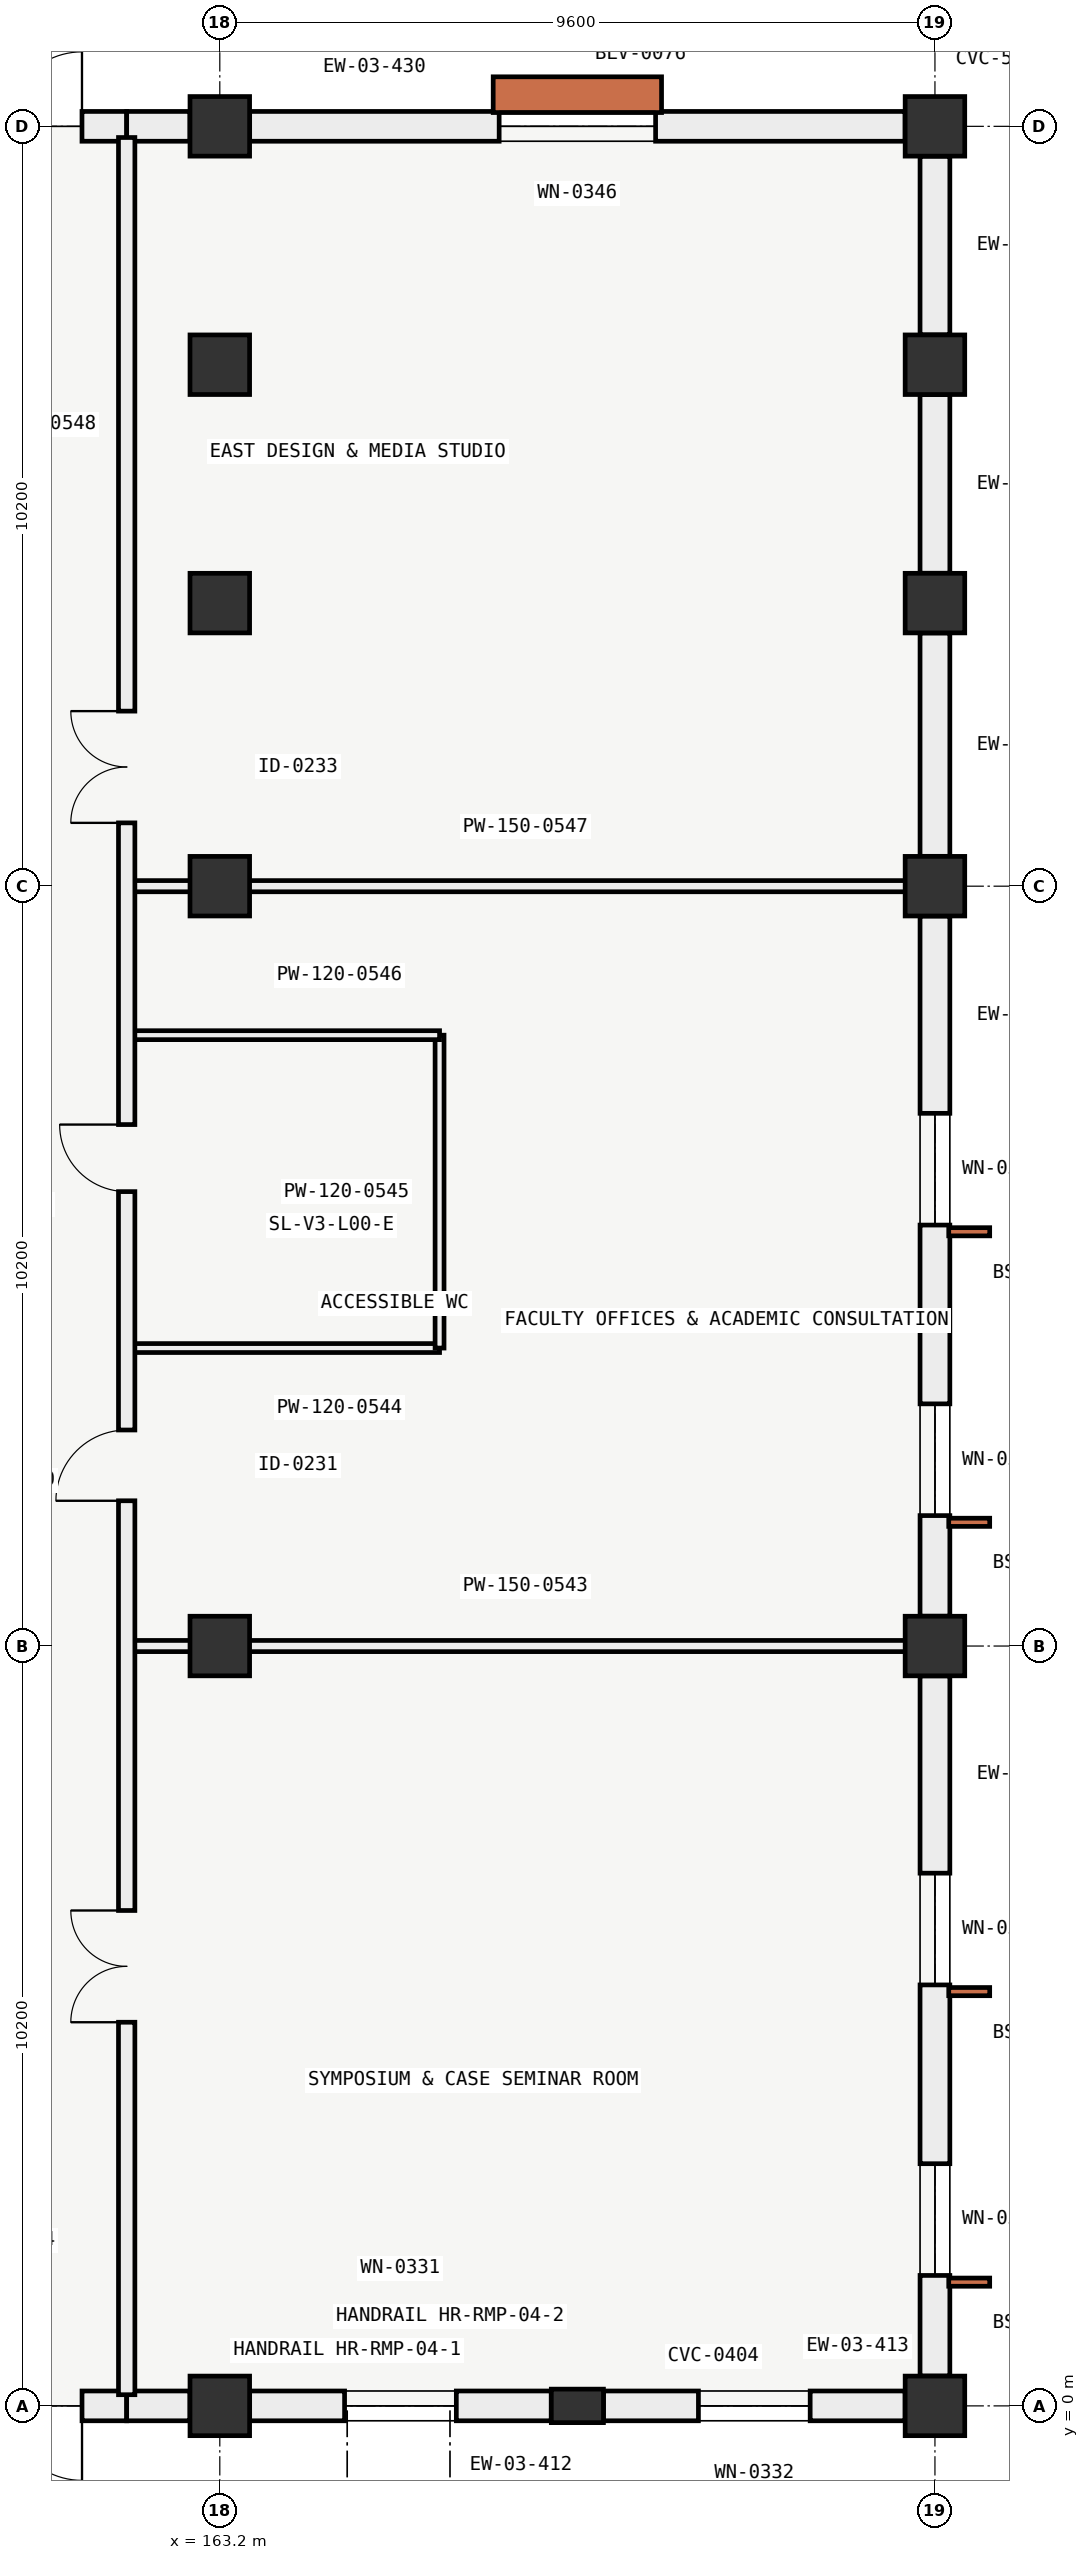
"""IFC4 building model, lengths in metres.
Left out: names, types, materials, properties, quantities, classifications, styles, units other than length and angle.
Written with IfcOpenShell. Run it as: python <this file> out.ifc"""

import sys

from ifc_helpers import new_model, si_unit, direction, frame, frame_2d, origin, origin_2d, place, context, subcontext, project, spatial, rectangle, extrude, element, fill, save


model = new_model("IFC4")
c1 = context("Model", 3, precision=1e-05, world=origin(), true_north=direction((0.0, 1.0)))
c2 = subcontext(c1, "Body", "Model", "MODEL_VIEW")
j1 = project(units=[si_unit("LENGTHUNIT", "METRE"), si_unit("PLANEANGLEUNIT", "RADIAN")], contexts=[c1])
p1 = place(None, origin())
s1 = spatial("IfcSite", under=j1, at=p1, CompositionType="ELEMENT")
p2 = place(p1, origin())
s2 = spatial("IfcBuilding", under=s1, at=p2, CompositionType="ELEMENT")
p3 = place(p2, origin())
s3 = spatial("IfcBuildingStorey", under=s2, at=p3, CompositionType="ELEMENT", Elevation=0.0)
for number, where, z_axis, x_axis in (
    (1, (163.2, 0.0, 0.0), (0.0, 0.0, 1.0), (1.0, 0.0, 0.0)),
    (2, (163.2, 10.2, 0.0), (0.0, 0.0, 1.0), (1.0, 0.0, 0.0)),
    (3, (163.2, 20.4, 0.0), (0.0, 0.0, 1.0), (1.0, 0.0, 0.0)),
    (4, (163.2, 24.2, 0.0), (0.0, 0.0, 1.0), (1.0, 0.0, 0.0)),
    (5, (163.2, 27.4, 0.0), (0.0, 0.0, 1.0), (1.0, 0.0, 0.0)),
    (6, (163.2, 30.6, 0.0), (0.0, 0.0, 1.0), (1.0, 0.0, 0.0)),
    (7, (172.8, 0.0, 0.0), (0.0, 0.0, 1.0), (1.0, 0.0, 0.0)),
    (8, (172.8, 10.2, 0.0), (0.0, 0.0, 1.0), (1.0, 0.0, 0.0)),
    (9, (172.8, 20.4, 0.0), (0.0, 0.0, 1.0), (1.0, 0.0, 0.0)),
    (10, (172.8, 24.2, 0.0), (0.0, 0.0, 1.0), (1.0, 0.0, 0.0)),
    (11, (172.8, 27.4, 0.0), (0.0, 0.0, 1.0), (1.0, 0.0, 0.0)),
    (12, (172.8, 30.6, 0.0), (0.0, 0.0, 1.0), (1.0, 0.0, 0.0)),
):
    element("IfcColumn", number, at=place(p3, frame(where, z_axis=z_axis, x_axis=x_axis)), inside=s3, PredefinedType="COLUMN", context=c2, shape_type="SweptSolid", body=[
        extrude(rectangle(XDim=0.8, YDim=0.8, at=origin_2d()), origin(), (0.0, 0.0, 1.0), 5.4),
    ])
p4 = place(p3, frame((168.0, 0.0, 0.0), z_axis=(0.0, 0.0, 1.0), x_axis=(0.0, 1.0, 0.0)))
e13 = element("IfcColumn", 13, at=p4, inside=s3, PredefinedType="PILASTER", context=c2, shape_type="SweptSolid", body=[
    extrude(rectangle(XDim=0.45, YDim=0.7, at=origin_2d()), origin(), (0.0, 0.0, 1.0), 5.4),
])
p5 = place(p3, frame((161.95, 0.0, 0.0), z_axis=(0.0, 0.0, 1.0), x_axis=(-1.0, 0.0, 0.0)))
e14 = element("IfcWall", 14, at=p5, inside=s3, PredefinedType="SOLIDWALL", context=c2, shape_type="SweptSolid", body=[
    extrude(rectangle(XDim=3.199, YDim=0.4, at=frame_2d((1.6, 0.0))), origin(), (0.0, 0.0, 1.0), 4.45),
])
p6 = place(p5, frame((0.6, 0.0, 0.0)))
e15 = element("IfcOpeningElement", 15, at=p6, cuts=e14, PredefinedType="OPENING", context=c2, shape_type="SweptSolid", body=[
    extrude(rectangle(XDim=2.0, YDim=2.4, at=frame_2d((1.0, 1.2))), frame((0.0, 0.21, 0.0), z_axis=(0.0, -1.0, 0.0), x_axis=(1.0, 0.0, 0.0)), (0.0, 0.0, 1.0), 0.42),
])
p7 = place(p3, frame((162.799, 0.0, 0.0), z_axis=(0.0, 0.0, 1.0), x_axis=(-1.0, 0.0, 0.0)))
e16 = element("IfcWall", 16, at=p7, inside=s3, PredefinedType="SOLIDWALL", context=c2, shape_type="SweptSolid", body=[
    extrude(rectangle(XDim=0.849, YDim=0.4, at=frame_2d((0.425, 0.0))), origin(), (0.0, 0.0, 1.0), 4.45),
])
p8 = place(p3, frame((167.649, 0.0, 0.0), z_axis=(0.0, 0.0, 1.0), x_axis=(-1.0, 0.0, 0.0)))
e17 = element("IfcWall", 17, at=p8, inside=s3, PredefinedType="SOLIDWALL", context=c2, shape_type="SweptSolid", body=[
    extrude(rectangle(XDim=4.048, YDim=0.4, at=frame_2d((2.024, 0.0))), origin(), (0.0, 0.0, 1.0), 4.45),
])
p9 = place(p8, frame((1.274, 0.0, 0.85)))
e18 = element("IfcOpeningElement", 18, at=p9, cuts=e17, PredefinedType="OPENING", context=c2, shape_type="SweptSolid", body=[
    extrude(rectangle(XDim=1.5, YDim=2.6, at=frame_2d((0.75, 1.3))), frame((0.0, 0.21, 0.0), z_axis=(0.0, -1.0, 0.0), x_axis=(1.0, 0.0, 0.0)), (0.0, 0.0, 1.0), 0.42),
])
p10 = place(p3, frame((172.399, 0.0, 0.0), z_axis=(0.0, 0.0, 1.0), x_axis=(-1.0, 0.0, 0.0)))
e19 = element("IfcWall", 19, at=p10, inside=s3, PredefinedType="SOLIDWALL", context=c2, shape_type="SweptSolid", body=[
    extrude(rectangle(XDim=4.048, YDim=0.4, at=frame_2d((2.024, 0.0))), origin(), (0.0, 0.0, 1.0), 4.45),
])
p11 = place(p10, frame((1.274, 0.0, 0.85)))
e20 = element("IfcOpeningElement", 20, at=p11, cuts=e19, PredefinedType="OPENING", context=c2, shape_type="SweptSolid", body=[
    extrude(rectangle(XDim=1.5, YDim=2.6, at=frame_2d((0.75, 1.3))), frame((0.0, 0.21, 0.0), z_axis=(0.0, -1.0, 0.0), x_axis=(1.0, 0.0, 0.0)), (0.0, 0.0, 1.0), 0.42),
])
p12 = place(p3, frame((172.8, 9.799, 0.0), z_axis=(0.0, 0.0, 1.0), x_axis=(0.0, -1.0, 0.0)))
e21 = element("IfcWall", 21, at=p12, inside=s3, PredefinedType="SOLIDWALL", context=c2, shape_type="SweptSolid", body=[
    extrude(rectangle(XDim=9.398, YDim=0.4, at=frame_2d((4.699, 0.0))), origin(), (0.0, 0.0, 1.0), 4.45),
])
p13 = place(p12, frame((6.548, 0.0, 0.85)))
e22 = element("IfcOpeningElement", 22, at=p13, cuts=e21, PredefinedType="OPENING", context=c2, shape_type="SweptSolid", body=[
    extrude(rectangle(XDim=1.5, YDim=2.6, at=frame_2d((0.75, 1.3))), frame((0.0, 0.21, 0.0), z_axis=(0.0, -1.0, 0.0), x_axis=(1.0, 0.0, 0.0)), (0.0, 0.0, 1.0), 0.42),
])
p14 = place(p12, frame((2.648, 0.0, 0.85)))
e23 = element("IfcOpeningElement", 23, at=p14, cuts=e21, PredefinedType="OPENING", context=c2, shape_type="SweptSolid", body=[
    extrude(rectangle(XDim=1.5, YDim=2.6, at=frame_2d((0.75, 1.3))), frame((0.0, 0.21, 0.0), z_axis=(0.0, -1.0, 0.0), x_axis=(1.0, 0.0, 0.0)), (0.0, 0.0, 1.0), 0.42),
])
p15 = place(p3, frame((172.8, 19.999, 0.0), z_axis=(0.0, 0.0, 1.0), x_axis=(0.0, -1.0, 0.0)))
e24 = element("IfcWall", 24, at=p15, inside=s3, PredefinedType="SOLIDWALL", context=c2, shape_type="SweptSolid", body=[
    extrude(rectangle(XDim=9.398, YDim=0.4, at=frame_2d((4.699, 0.0))), origin(), (0.0, 0.0, 1.0), 4.45),
])
p16 = place(p15, frame((6.548, 0.0, 0.85)))
e25 = element("IfcOpeningElement", 25, at=p16, cuts=e24, PredefinedType="OPENING", context=c2, shape_type="SweptSolid", body=[
    extrude(rectangle(XDim=1.5, YDim=2.6, at=frame_2d((0.75, 1.3))), frame((0.0, 0.21, 0.0), z_axis=(0.0, -1.0, 0.0), x_axis=(1.0, 0.0, 0.0)), (0.0, 0.0, 1.0), 0.42),
])
p17 = place(p15, frame((2.648, 0.0, 0.85)))
e26 = element("IfcOpeningElement", 26, at=p17, cuts=e24, PredefinedType="OPENING", context=c2, shape_type="SweptSolid", body=[
    extrude(rectangle(XDim=1.5, YDim=2.6, at=frame_2d((0.75, 1.3))), frame((0.0, 0.21, 0.0), z_axis=(0.0, -1.0, 0.0), x_axis=(1.0, 0.0, 0.0)), (0.0, 0.0, 1.0), 0.42),
])
for number, where, z_axis, x_axis in (
    (27, (172.8, 30.199, 0.0), (0.0, 0.0, 1.0), (0.0, -1.0, 0.0)),
    (28, (172.8, 26.999, 0.0), (0.0, 0.0, 1.0), (0.0, -1.0, 0.0)),
):
    element("IfcWall", number, at=place(p3, frame(where, z_axis=z_axis, x_axis=x_axis)), inside=s3, PredefinedType="SOLIDWALL", context=c2, shape_type="SweptSolid", body=[
        extrude(rectangle(XDim=2.398, YDim=0.4, at=frame_2d((1.199, 0.0))), origin(), (0.0, 0.0, 1.0), 4.45),
    ])
p18 = place(p3, frame((172.8, 23.799, 0.0), z_axis=(0.0, 0.0, 1.0), x_axis=(0.0, -1.0, 0.0)))
e29 = element("IfcWall", 29, at=p18, inside=s3, PredefinedType="SOLIDWALL", context=c2, shape_type="SweptSolid", body=[
    extrude(rectangle(XDim=2.998, YDim=0.4, at=frame_2d((1.499, 0.0))), origin(), (0.0, 0.0, 1.0), 4.45),
])
p19 = place(p3, frame((158.75, 30.6, 0.0), z_axis=(0.0, 0.0, 1.0), x_axis=(1.0, 0.0, 0.0)))
e30 = element("IfcWall", 30, at=p19, inside=s3, PredefinedType="SOLIDWALL", context=c2, shape_type="SweptSolid", body=[
    extrude(rectangle(XDim=3.2, YDim=0.4, at=frame_2d((1.6, 0.0))), origin(), (0.0, 0.0, 1.0), 4.45),
])
p20 = place(p19, frame((0.6, 0.0, 0.0)))
e31 = element("IfcOpeningElement", 31, at=p20, cuts=e30, PredefinedType="OPENING", context=c2, shape_type="SweptSolid", body=[
    extrude(rectangle(XDim=2.0, YDim=2.4, at=frame_2d((1.0, 1.2))), frame((0.0, 0.21, 0.0), z_axis=(0.0, -1.0, 0.0), x_axis=(1.0, 0.0, 0.0)), (0.0, 0.0, 1.0), 0.42),
])
p21 = place(p3, frame((161.95, 30.6, 0.0), z_axis=(0.0, 0.0, 1.0), x_axis=(1.0, 0.0, 0.0)))
e32 = element("IfcWall", 32, at=p21, inside=s3, PredefinedType="SOLIDWALL", context=c2, shape_type="SweptSolid", body=[
    extrude(rectangle(XDim=0.849, YDim=0.4, at=frame_2d((0.425, 0.0))), origin(), (0.0, 0.0, 1.0), 4.45),
])
p22 = place(p3, frame((163.601, 30.6, 0.0), z_axis=(0.0, 0.0, 1.0), x_axis=(1.0, 0.0, 0.0)))
e33 = element("IfcWall", 33, at=p22, inside=s3, PredefinedType="SOLIDWALL", context=c2, shape_type="SweptSolid", body=[
    extrude(rectangle(XDim=8.798, YDim=0.4, at=frame_2d((4.399, 0.0))), origin(), (0.0, 0.0, 1.0), 4.45),
])
p23 = place(p22, frame((3.349, 0.0, 0.85)))
e34 = element("IfcOpeningElement", 34, at=p23, cuts=e33, PredefinedType="OPENING", context=c2, shape_type="SweptSolid", body=[
    extrude(rectangle(XDim=2.1, YDim=2.4, at=frame_2d((1.05, 1.2))), frame((0.0, 0.21, 0.0), z_axis=(0.0, -1.0, 0.0), x_axis=(1.0, 0.0, 0.0)), (0.0, 0.0, 1.0), 0.42),
])
p24 = place(p3, frame((161.95, 10.2, 0.0), z_axis=(0.0, 0.0, 1.0), x_axis=(1.0, 0.0, 0.0)))
e35 = element("IfcWall", 35, at=p24, inside=s3, PredefinedType="PARTITIONING", context=c2, shape_type="SweptSolid", body=[
    extrude(rectangle(XDim=10.7, YDim=0.15, at=frame_2d((5.35, 0.0))), origin(), (0.0, 0.0, 1.0), 4.4),
])
p25 = place(p3, frame((161.95, 14.2, 0.0), z_axis=(0.0, 0.0, 1.0), x_axis=(1.0, 0.0, 0.0)))
e36 = element("IfcWall", 36, at=p25, inside=s3, PredefinedType="PARTITIONING", context=c2, shape_type="SweptSolid", body=[
    extrude(rectangle(XDim=4.2, YDim=0.12, at=frame_2d((2.1, 0.0))), origin(), (0.0, 0.0, 1.0), 4.45),
])
p26 = place(p3, frame((166.15, 14.2, 0.0), z_axis=(0.0, 0.0, 1.0), x_axis=(0.0, 1.0, 0.0)))
e37 = element("IfcWall", 37, at=p26, inside=s3, PredefinedType="PARTITIONING", context=c2, shape_type="SweptSolid", body=[
    extrude(rectangle(XDim=4.2, YDim=0.12, at=frame_2d((2.1, 0.0))), origin(), (0.0, 0.0, 1.0), 5.05),
])
p27 = place(p3, frame((161.95, 18.4, 0.0), z_axis=(0.0, 0.0, 1.0), x_axis=(1.0, 0.0, 0.0)))
e38 = element("IfcWall", 38, at=p27, inside=s3, PredefinedType="PARTITIONING", context=c2, shape_type="SweptSolid", body=[
    extrude(rectangle(XDim=4.2, YDim=0.12, at=frame_2d((2.1, 0.0))), origin(), (0.0, 0.0, 1.0), 4.45),
])
p28 = place(p3, frame((161.95, 20.4, 0.0), z_axis=(0.0, 0.0, 1.0), x_axis=(1.0, 0.0, 0.0)))
e39 = element("IfcWall", 39, at=p28, inside=s3, PredefinedType="PARTITIONING", context=c2, shape_type="SweptSolid", body=[
    extrude(rectangle(XDim=10.7, YDim=0.15, at=frame_2d((5.35, 0.0))), origin(), (0.0, 0.0, 1.0), 4.4),
])
p29 = place(p3, frame((161.95, 0.15, 0.0), z_axis=(0.0, 0.0, 1.0), x_axis=(0.0, 1.0, 0.0)))
e40 = element("IfcWall", 40, at=p29, inside=s3, PredefinedType="PARTITIONING", context=c2, shape_type="SweptSolid", body=[
    extrude(rectangle(XDim=30.3, YDim=0.22, at=frame_2d((15.15, 0.0))), origin(), (0.0, 0.0, 1.0), 4.4),
])
p30 = place(p29, frame((5.0, 0.0, 0.0)))
e41 = element("IfcOpeningElement", 41, at=p30, cuts=e40, PredefinedType="OPENING", context=c2, shape_type="SweptSolid", body=[
    extrude(rectangle(XDim=1.5, YDim=2.2, at=frame_2d((0.75, 1.1))), frame((0.0, 0.12, 0.0), z_axis=(0.0, -1.0, 0.0), x_axis=(1.0, 0.0, 0.0)), (0.0, 0.0, 1.0), 0.24),
])
p31 = place(p29, frame((12.0, 0.0, 0.0)))
e42 = element("IfcOpeningElement", 42, at=p31, cuts=e40, PredefinedType="OPENING", context=c2, shape_type="SweptSolid", body=[
    extrude(rectangle(XDim=0.95, YDim=2.1, at=frame_2d((0.475, 1.05))), frame((0.0, 0.12, 0.0), z_axis=(0.0, -1.0, 0.0), x_axis=(1.0, 0.0, 0.0)), (0.0, 0.0, 1.0), 0.24),
])
p32 = place(p29, frame((16.15, 0.0, 0.0)))
e43 = element("IfcOpeningElement", 43, at=p32, cuts=e40, PredefinedType="OPENING", context=c2, shape_type="SweptSolid", body=[
    extrude(rectangle(XDim=0.9, YDim=2.05, at=frame_2d((0.45, 1.025))), frame((0.0, 0.12, 0.0), z_axis=(0.0, -1.0, 0.0), x_axis=(1.0, 0.0, 0.0)), (0.0, 0.0, 1.0), 0.24),
])
p33 = place(p29, frame((21.1, 0.0, 0.0)))
e44 = element("IfcOpeningElement", 44, at=p33, cuts=e40, PredefinedType="OPENING", context=c2, shape_type="SweptSolid", body=[
    extrude(rectangle(XDim=1.5, YDim=2.2, at=frame_2d((0.75, 1.1))), frame((0.0, 0.12, 0.0), z_axis=(0.0, -1.0, 0.0), x_axis=(1.0, 0.0, 0.0)), (0.0, 0.0, 1.0), 0.24),
])
p34 = place(p6, origin())
e45 = element("IfcDoor", 45, at=p34, inside=s3, OperationType="DOUBLE_DOOR_SINGLE_SWING", PredefinedType="DOOR", context=c2, shape_type="SweptSolid", body=[
    extrude(rectangle(XDim=2.0, YDim=2.4, at=frame_2d((1.0, 1.2))), frame((0.0, 0.025, 0.0), z_axis=(0.0, -1.0, 0.0), x_axis=(1.0, 0.0, 0.0)), (0.0, 0.0, 1.0), 0.05),
])
fill(e15, e45)
p35 = place(p9, origin())
e46 = element("IfcWindow", 46, at=p35, inside=s3, PartitioningType="SINGLE_PANEL", PredefinedType="WINDOW", context=c2, shape_type="SweptSolid", body=[
    extrude(rectangle(XDim=1.5, YDim=2.6, at=frame_2d((0.75, 1.3))), frame((0.0, 0.03, 0.0), z_axis=(0.0, -1.0, 0.0), x_axis=(1.0, 0.0, 0.0)), (0.0, 0.0, 1.0), 0.06),
])
fill(e18, e46)
p36 = place(p11, origin())
e47 = element("IfcWindow", 47, at=p36, inside=s3, PartitioningType="SINGLE_PANEL", PredefinedType="WINDOW", context=c2, shape_type="SweptSolid", body=[
    extrude(rectangle(XDim=1.5, YDim=2.6, at=frame_2d((0.75, 1.3))), frame((0.0, 0.03, 0.0), z_axis=(0.0, -1.0, 0.0), x_axis=(1.0, 0.0, 0.0)), (0.0, 0.0, 1.0), 0.06),
])
fill(e20, e47)
p37 = place(p13, origin())
e48 = element("IfcWindow", 48, at=p37, inside=s3, PartitioningType="SINGLE_PANEL", PredefinedType="WINDOW", context=c2, shape_type="SweptSolid", body=[
    extrude(rectangle(XDim=1.5, YDim=2.6, at=frame_2d((0.75, 1.3))), frame((0.0, 0.03, 0.0), z_axis=(0.0, -1.0, 0.0), x_axis=(1.0, 0.0, 0.0)), (0.0, 0.0, 1.0), 0.06),
])
fill(e22, e48)
p38 = place(p14, origin())
e49 = element("IfcWindow", 49, at=p38, inside=s3, PartitioningType="SINGLE_PANEL", PredefinedType="WINDOW", context=c2, shape_type="SweptSolid", body=[
    extrude(rectangle(XDim=1.5, YDim=2.6, at=frame_2d((0.75, 1.3))), frame((0.0, 0.03, 0.0), z_axis=(0.0, -1.0, 0.0), x_axis=(1.0, 0.0, 0.0)), (0.0, 0.0, 1.0), 0.06),
])
fill(e23, e49)
p39 = place(p16, origin())
e50 = element("IfcWindow", 50, at=p39, inside=s3, PartitioningType="SINGLE_PANEL", PredefinedType="WINDOW", context=c2, shape_type="SweptSolid", body=[
    extrude(rectangle(XDim=1.5, YDim=2.6, at=frame_2d((0.75, 1.3))), frame((0.0, 0.03, 0.0), z_axis=(0.0, -1.0, 0.0), x_axis=(1.0, 0.0, 0.0)), (0.0, 0.0, 1.0), 0.06),
])
fill(e25, e50)
p40 = place(p17, origin())
e51 = element("IfcWindow", 51, at=p40, inside=s3, PartitioningType="SINGLE_PANEL", PredefinedType="WINDOW", context=c2, shape_type="SweptSolid", body=[
    extrude(rectangle(XDim=1.5, YDim=2.6, at=frame_2d((0.75, 1.3))), frame((0.0, 0.03, 0.0), z_axis=(0.0, -1.0, 0.0), x_axis=(1.0, 0.0, 0.0)), (0.0, 0.0, 1.0), 0.06),
])
fill(e26, e51)
p41 = place(p20, origin())
e52 = element("IfcDoor", 52, at=p41, inside=s3, OperationType="DOUBLE_DOOR_SINGLE_SWING", PredefinedType="DOOR", context=c2, shape_type="SweptSolid", body=[
    extrude(rectangle(XDim=2.0, YDim=2.4, at=frame_2d((1.0, 1.2))), frame((0.0, 0.025, 0.0), z_axis=(0.0, -1.0, 0.0), x_axis=(1.0, 0.0, 0.0)), (0.0, 0.0, 1.0), 0.05),
])
fill(e31, e52)
p42 = place(p23, origin())
e53 = element("IfcWindow", 53, at=p42, inside=s3, PartitioningType="SINGLE_PANEL", PredefinedType="WINDOW", context=c2, shape_type="SweptSolid", body=[
    extrude(rectangle(XDim=2.1, YDim=2.4, at=frame_2d((1.05, 1.2))), frame((0.0, 0.03, 0.0), z_axis=(0.0, -1.0, 0.0), x_axis=(1.0, 0.0, 0.0)), (0.0, 0.0, 1.0), 0.06),
])
fill(e34, e53)
p43 = place(p30, origin())
e54 = element("IfcDoor", 54, at=p43, inside=s3, OperationType="DOUBLE_DOOR_SINGLE_SWING", PredefinedType="DOOR", context=c2, shape_type="SweptSolid", body=[
    extrude(rectangle(XDim=1.5, YDim=2.2, at=frame_2d((0.75, 1.1))), frame((0.0, 0.025, 0.0), z_axis=(0.0, -1.0, 0.0), x_axis=(1.0, 0.0, 0.0)), (0.0, 0.0, 1.0), 0.05),
])
fill(e41, e54)
p44 = place(p31, origin())
e55 = element("IfcDoor", 55, at=p44, inside=s3, OperationType="SINGLE_SWING_LEFT", PredefinedType="DOOR", context=c2, shape_type="SweptSolid", body=[
    extrude(rectangle(XDim=0.95, YDim=2.1, at=frame_2d((0.475, 1.05))), frame((0.0, 0.025, 0.0), z_axis=(0.0, -1.0, 0.0), x_axis=(1.0, 0.0, 0.0)), (0.0, 0.0, 1.0), 0.05),
])
fill(e42, e55)
p45 = place(p32, origin())
e56 = element("IfcDoor", 56, at=p45, inside=s3, OperationType="SINGLE_SWING_RIGHT", PredefinedType="DOOR", context=c2, shape_type="SweptSolid", body=[
    extrude(rectangle(XDim=0.9, YDim=2.05, at=frame_2d((0.45, 1.025))), frame((0.0, 0.025, 0.0), z_axis=(0.0, -1.0, 0.0), x_axis=(1.0, 0.0, 0.0)), (0.0, 0.0, 1.0), 0.05),
])
fill(e43, e56)
p46 = place(p33, origin())
e57 = element("IfcDoor", 57, at=p46, inside=s3, OperationType="DOUBLE_DOOR_SINGLE_SWING", PredefinedType="DOOR", context=c2, shape_type="SweptSolid", body=[
    extrude(rectangle(XDim=1.5, YDim=2.2, at=frame_2d((0.75, 1.1))), frame((0.0, 0.025, 0.0), z_axis=(0.0, -1.0, 0.0), x_axis=(1.0, 0.0, 0.0)), (0.0, 0.0, 1.0), 0.05),
])
fill(e44, e57)
save(model, sys.argv[1])
